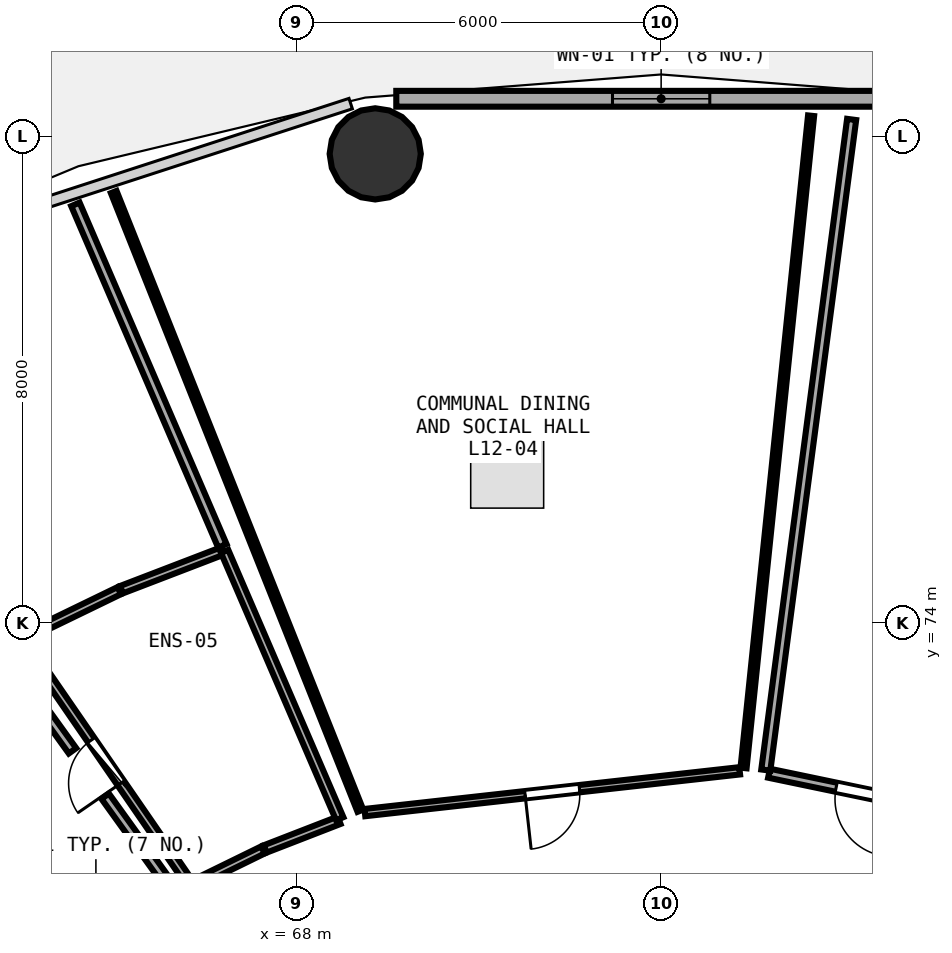
"""IFC4 building model, lengths in metres.
Left out: names, types, materials, properties, quantities, classifications, styles, units other than length and angle.
Written with IfcOpenShell. Run it as: python <this file> out.ifc"""

import sys

from ifc_helpers import new_model, si_unit, direction, frame, frame_2d, origin, origin_2d, place, context, subcontext, project, spatial, rectangle, circle, extrude, element, fill, save


model = new_model("IFC4")
c1 = context("Model", 3, precision=1e-05, world=origin(), true_north=direction((0.0, 1.0)))
c2 = subcontext(c1, "Body", "Model", "MODEL_VIEW")
j1 = project(units=[si_unit("LENGTHUNIT", "METRE"), si_unit("PLANEANGLEUNIT", "RADIAN")], contexts=[c1])
p1 = place(None, origin())
s1 = spatial("IfcSite", under=j1, at=p1, CompositionType="ELEMENT")
p2 = place(p1, origin())
s2 = spatial("IfcBuilding", under=s1, at=p2, CompositionType="ELEMENT")
p3 = place(p2, frame((0.0, 0.0, 48.75)))
s3 = spatial("IfcBuildingStorey", under=s2, at=p3, CompositionType="ELEMENT", Elevation=48.75)
p4 = place(p3, frame((69.298, 81.714, 0.0), z_axis=(0.0, 0.0, 1.0), x_axis=(1.0, 0.0, 0.0)))
e1 = element("IfcColumn", 1, at=p4, inside=s3, PredefinedType="COLUMN", context=c2, shape_type="SweptSolid", body=[
    extrude(circle(Radius=0.75, at=origin_2d()), origin(), (0.0, 0.0, 1.0), 3.75),
])
p5 = place(p3, frame((78.356, 82.62, 0.0), z_axis=(0.0, 0.0, 1.0), x_axis=(-1.0, 0.0, 0.0)))
e2 = element("IfcWall", 2, at=p5, inside=s3, PredefinedType="SOLIDWALL", context=c2, shape_type="SweptSolid", body=[
    extrude(rectangle(XDim=8.712, YDim=0.26, at=frame_2d((4.356, 0.0))), origin(), (0.0, 0.0, 1.0), 3.475),
])
p6 = place(p5, frame((3.556, 0.0, 0.85)))
e3 = element("IfcOpeningElement", 3, at=p6, cuts=e2, PredefinedType="OPENING", context=c2, shape_type="SweptSolid", body=[
    extrude(rectangle(XDim=1.6, YDim=1.45, at=frame_2d((0.8, 0.725))), frame((0.0, 0.14, 0.0), z_axis=(0.0, -1.0, 0.0), x_axis=(1.0, 0.0, 0.0)), (0.0, 0.0, 1.0), 0.28),
])
p7 = place(p3, frame((78.914, 70.874, 0.0), z_axis=(0.0, 0.0, 1.0), x_axis=(-0.978952544969, 0.204088007237, 0.0)))
e4 = element("IfcWall", 4, at=p7, inside=s3, PredefinedType="PARTITIONING", context=c2, shape_type="SweptSolid", body=[
    extrude(rectangle(XDim=3.207, YDim=0.15, at=frame_2d((1.604, 0.0))), origin(), (0.0, 0.0, 1.0), 3.235),
])
p8 = place(p7, frame((1.129, 0.0, 0.0)))
e5 = element("IfcOpeningElement", 5, at=p8, cuts=e4, PredefinedType="OPENING", context=c2, shape_type="SweptSolid", body=[
    extrude(rectangle(XDim=0.95, YDim=2.08, at=frame_2d((0.475, 1.04))), frame((0.0, 0.085, 0.0), z_axis=(0.0, -1.0, 0.0), x_axis=(1.0, 0.0, 0.0)), (0.0, 0.0, 1.0), 0.17),
])
p9 = place(p3, frame((75.292, 71.568, 0.0), z_axis=(0.0, 0.0, 1.0), x_axis=(-0.993850084324, -0.110733959964, 0.0)))
e6 = element("IfcWall", 6, at=p9, inside=s3, PredefinedType="PARTITIONING", context=c2, shape_type="SweptSolid", body=[
    extrude(rectangle(XDim=6.202, YDim=0.12, at=frame_2d((3.101, 0.0))), origin(), (0.0, 0.0, 1.0), 2.875),
])
p10 = place(p9, frame((2.651, 0.0, 0.0)))
e7 = element("IfcOpeningElement", 7, at=p10, cuts=e6, PredefinedType="OPENING", context=c2, shape_type="SweptSolid", body=[
    extrude(rectangle(XDim=0.9, YDim=2.08, at=frame_2d((0.45, 1.04))), frame((0.0, 0.07, 0.0), z_axis=(0.0, -1.0, 0.0), x_axis=(1.0, 0.0, 0.0)), (0.0, 0.0, 1.0), 0.14),
])
p11 = place(p3, frame((66.235, 69.738, 0.0), z_axis=(0.0, 0.0, 1.0), x_axis=(-0.567426867042, 0.823423797664, 0.0)))
e8 = element("IfcWall", 8, at=p11, inside=s3, PredefinedType="PLUMBINGWALL", context=c2, shape_type="SweptSolid", body=[
    extrude(rectangle(XDim=4.809, YDim=0.13, at=frame_2d((2.405, 0.0))), origin(), (0.0, 0.0, 1.0), 3.175),
])
p12 = place(p11, frame((1.975, 0.0, 0.0)))
e9 = element("IfcOpeningElement", 9, at=p12, cuts=e8, PredefinedType="OPENING", context=c2, shape_type="SweptSolid", body=[
    extrude(rectangle(XDim=0.86, YDim=2.05, at=frame_2d((0.43, 1.025))), frame((0.0, 0.075, 0.0), z_axis=(0.0, -1.0, 0.0), x_axis=(1.0, 0.0, 0.0)), (0.0, 0.0, 1.0), 0.15),
])
p13 = place(p3, frame((75.721, 71.581, 0.0), z_axis=(0.0, 0.0, 1.0), x_axis=(0.130800348515, 0.991408729449, 0.0)))
e10 = element("IfcWall", 10, at=p13, inside=s3, PredefinedType="PARTITIONING", context=c2, shape_type="SweptSolid", body=[
    extrude(rectangle(XDim=10.792, YDim=0.15, at=frame_2d((5.396, 0.0))), origin(), (0.0, 0.0, 1.0), 2.875),
])
p14 = place(p3, frame((69.053, 70.912, 0.0), z_axis=(0.0, 0.0, 1.0), x_axis=(-0.370325956987, 0.928901870803, 0.0)))
e11 = element("IfcWall", 11, at=p14, inside=s3, PredefinedType="PARTITIONING", context=c2, shape_type="SweptSolid", body=[
    extrude(rectangle(XDim=10.954, YDim=0.1, at=frame_2d((5.477, 0.0))), origin(), (0.0, 0.0, 1.0), 2.875),
])
p15 = place(p3, frame((76.466, 82.341, 0.0), z_axis=(0.0, 0.0, 1.0), x_axis=(-0.103008831227, -0.994680441493, 0.0)))
e12 = element("IfcWall", 12, at=p15, inside=s3, PredefinedType="PARTITIONING", context=c2, shape_type="SweptSolid", body=[
    extrude(rectangle(XDim=10.784, YDim=0.1, at=frame_2d((5.392, 0.0))), origin(), (0.0, 0.0, 1.0), 2.875),
])
p16 = place(p3, frame((68.703, 70.755, 0.0), z_axis=(0.0, 0.0, 1.0), x_axis=(-0.932299479839, -0.361687268082, 0.0)))
e13 = element("IfcWall", 13, at=p16, inside=s3, PredefinedType="PLUMBINGWALL", context=c2, shape_type="SweptSolid", body=[
    extrude(rectangle(XDim=1.304, YDim=0.13, at=frame_2d((0.652, 0.0))), origin(), (0.0, 0.0, 1.0), 3.48),
])
p17 = place(p3, frame((67.451, 70.267, 0.0), z_axis=(0.0, 0.0, 1.0), x_axis=(-0.898275282077, -0.439433177639, 0.0)))
e14 = element("IfcWall", 14, at=p17, inside=s3, PredefinedType="PLUMBINGWALL", context=c2, shape_type="SweptSolid", body=[
    extrude(rectangle(XDim=1.296, YDim=0.13, at=frame_2d((0.648, 0.0))), origin(), (0.0, 0.0, 1.0), 3.48),
])
p18 = place(p3, frame((63.49, 73.757, 0.0), z_axis=(0.0, 0.0, 1.0), x_axis=(0.899832096889, 0.436236400829, 0.0)))
e15 = element("IfcWall", 15, at=p18, inside=s3, PredefinedType="PLUMBINGWALL", context=c2, shape_type="SweptSolid", body=[
    extrude(rectangle(XDim=1.776, YDim=0.13, at=frame_2d((0.888, 0.0))), origin(), (0.0, 0.0, 1.0), 3.48),
])
p19 = place(p3, frame((65.125, 74.547, 0.0), z_axis=(0.0, 0.0, 1.0), x_axis=(0.93361980904, 0.35826533766, 0.0)))
e16 = element("IfcWall", 16, at=p19, inside=s3, PredefinedType="PLUMBINGWALL", context=c2, shape_type="SweptSolid", body=[
    extrude(rectangle(XDim=1.788, YDim=0.13, at=frame_2d((0.894, 0.0))), origin(), (0.0, 0.0, 1.0), 3.48),
])
p20 = place(p3, frame((66.821, 75.177, 0.0), z_axis=(0.0, 0.0, 1.0), x_axis=(0.395562338017, -0.918439130668, 0.0)))
e17 = element("IfcWall", 17, at=p20, inside=s3, PredefinedType="PLUMBINGWALL", context=c2, shape_type="SweptSolid", body=[
    extrude(rectangle(XDim=4.786, YDim=0.13, at=frame_2d((2.393, 0.0))), origin(), (0.0, 0.0, 1.0), 3.175),
])
p21 = place(p3, frame((64.367, 80.884, 0.0), z_axis=(0.0, 0.0, 1.0), x_axis=(0.395282873179, -0.918559442917, 0.0)))
e18 = element("IfcWall", 18, at=p21, inside=s3, PredefinedType="PARTITIONING", context=c2, shape_type="SweptSolid", body=[
    extrude(rectangle(XDim=6.113, YDim=0.15, at=frame_2d((3.057, 0.0))), origin(), (0.0, 0.0, 1.0), 2.875),
])
p22 = place(p3, frame((63.123, 73.558, 0.0), z_axis=(0.0, 0.0, 1.0), x_axis=(0.58432672942, -0.811518498425, 0.0)))
e19 = element("IfcWall", 19, at=p22, inside=s3, PredefinedType="PARTITIONING", context=c2, shape_type="SweptSolid", body=[
    extrude(rectangle(XDim=2.046, YDim=0.15, at=frame_2d((1.023, 0.0))), origin(), (0.0, 0.0, 1.0), 3.175),
])
p23 = place(p3, frame((64.857, 71.151, 0.0), z_axis=(0.0, 0.0, 1.0), x_axis=(0.584298085417, -0.811539122519, 0.0)))
e20 = element("IfcWall", 20, at=p23, inside=s3, PredefinedType="PARTITIONING", context=c2, shape_type="SweptSolid", body=[
    extrude(rectangle(XDim=1.937, YDim=0.15, at=frame_2d((0.969, 0.0))), origin(), (0.0, 0.0, 1.0), 3.235),
])
p24 = place(p6, origin())
e21 = element("IfcWindow", 21, at=p24, inside=s3, PartitioningType="SINGLE_PANEL", PredefinedType="WINDOW", context=c2, shape_type="SweptSolid", body=[
    extrude(rectangle(XDim=1.6, YDim=1.45, at=frame_2d((0.8, 0.725))), frame((0.0, 0.03, 0.0), z_axis=(0.0, -1.0, 0.0), x_axis=(1.0, 0.0, 0.0)), (0.0, 0.0, 1.0), 0.06),
])
fill(e3, e21)
p25 = place(p8, origin())
e22 = element("IfcDoor", 22, at=p25, inside=s3, OperationType="SINGLE_SWING_LEFT", PredefinedType="DOOR", context=c2, shape_type="SweptSolid", body=[
    extrude(rectangle(XDim=0.95, YDim=2.08, at=frame_2d((0.475, 1.04))), frame((0.0, 0.025, 0.0), z_axis=(0.0, -1.0, 0.0), x_axis=(1.0, 0.0, 0.0)), (0.0, 0.0, 1.0), 0.05),
])
fill(e5, e22)
p26 = place(p10, origin())
e23 = element("IfcDoor", 23, at=p26, inside=s3, OperationType="SINGLE_SWING_RIGHT", PredefinedType="DOOR", context=c2, shape_type="SweptSolid", body=[
    extrude(rectangle(XDim=0.9, YDim=2.08, at=frame_2d((0.45, 1.04))), frame((0.0, 0.025, 0.0), z_axis=(0.0, -1.0, 0.0), x_axis=(1.0, 0.0, 0.0)), (0.0, 0.0, 1.0), 0.05),
])
fill(e7, e23)
p27 = place(p12, origin())
e24 = element("IfcDoor", 24, at=p27, inside=s3, OperationType="SINGLE_SWING_LEFT", PredefinedType="DOOR", context=c2, shape_type="SweptSolid", body=[
    extrude(rectangle(XDim=0.86, YDim=2.05, at=frame_2d((0.43, 1.025))), frame((0.0, 0.025, 0.0), z_axis=(0.0, -1.0, 0.0), x_axis=(1.0, 0.0, 0.0)), (0.0, 0.0, 1.0), 0.05),
])
fill(e9, e24)
save(model, sys.argv[1])
